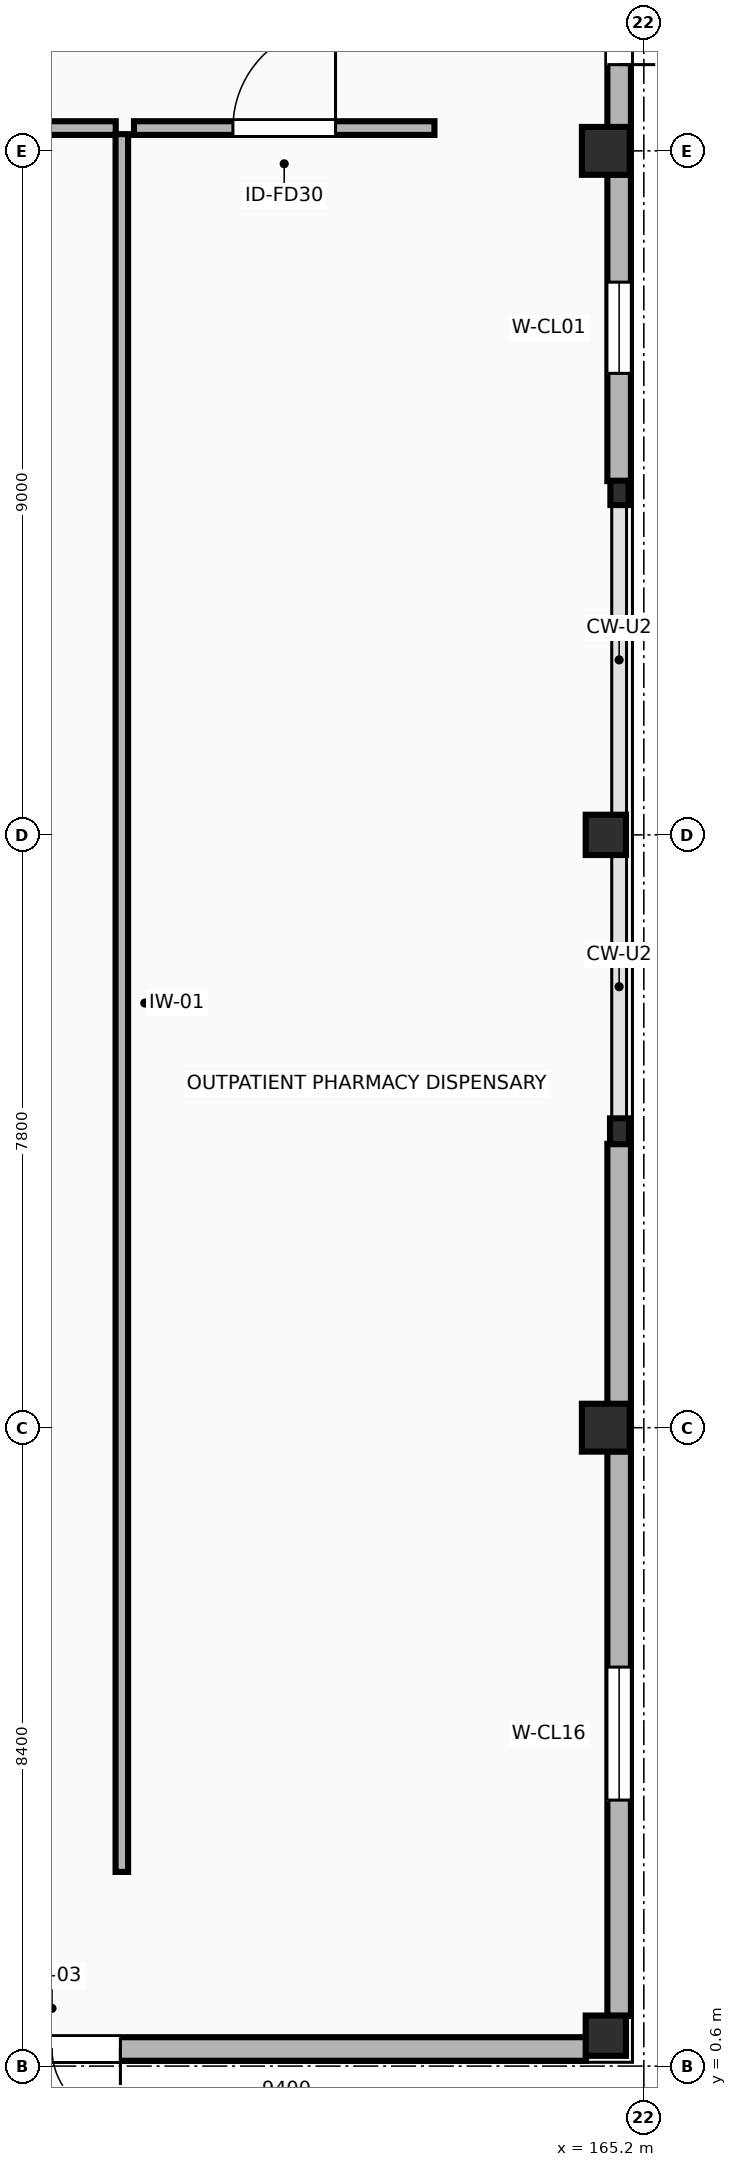
"""IFC4 building model, lengths in metres.
Left out: names, types, materials, properties, quantities, classifications, styles, units other than length and angle.
Written with IfcOpenShell. Run it as: python <this file> out.ifc"""

import sys

from ifc_helpers import new_model, si_unit, direction, frame, frame_2d, origin, origin_2d, place, context, subcontext, project, spatial, rectangle, extrude, element, fill, save


model = new_model("IFC4")
c1 = context("Model", 3, precision=1e-05, world=origin(), true_north=direction((0.0, 1.0)))
c2 = subcontext(c1, "Body", "Model", "MODEL_VIEW")
j1 = project(units=[si_unit("LENGTHUNIT", "METRE"), si_unit("PLANEANGLEUNIT", "RADIAN")], contexts=[c1])
p1 = place(None, origin())
s1 = spatial("IfcSite", under=j1, at=p1, CompositionType="ELEMENT")
p2 = place(p1, origin())
s2 = spatial("IfcBuilding", under=s1, at=p2, CompositionType="ELEMENT")
p3 = place(p2, origin())
s3 = spatial("IfcBuildingStorey", under=s2, at=p3, CompositionType="ELEMENT", Elevation=0.0)
p4 = place(p3, frame((164.7, 1.0, -1.75), z_axis=(0.0, 0.0, 1.0), x_axis=(1.0, 0.0, 0.0)))
e1 = element("IfcColumn", 1, at=p4, inside=s3, PredefinedType="COLUMN", context=c2, shape_type="SweptSolid", body=[
    extrude(rectangle(XDim=0.53, YDim=0.53, at=origin_2d()), origin(), (0.0, 0.0, 1.0), 7.15),
])
p5 = place(p3, frame((164.7, 9.0, -1.75), z_axis=(0.0, 0.0, 1.0), x_axis=(1.0, 0.0, 0.0)))
e2 = element("IfcColumn", 2, at=p5, inside=s3, PredefinedType="COLUMN", context=c2, shape_type="SweptSolid", body=[
    extrude(rectangle(XDim=0.63, YDim=0.63, at=origin_2d()), origin(), (0.0, 0.0, 1.0), 7.15),
])
p6 = place(p3, frame((164.7, 16.8, 0.0), z_axis=(0.0, 0.0, 1.0), x_axis=(1.0, 0.0, 0.0)))
e3 = element("IfcColumn", 3, at=p6, inside=s3, PredefinedType="COLUMN", context=c2, shape_type="SweptSolid", body=[
    extrude(rectangle(XDim=0.53, YDim=0.53, at=origin_2d()), origin(), (0.0, 0.0, 1.0), 5.4),
])
p7 = place(p3, frame((164.7, 25.8, 0.0), z_axis=(0.0, 0.0, 1.0), x_axis=(1.0, 0.0, 0.0)))
e4 = element("IfcColumn", 4, at=p7, inside=s3, PredefinedType="COLUMN", context=c2, shape_type="SweptSolid", body=[
    extrude(rectangle(XDim=0.63, YDim=0.63, at=origin_2d()), origin(), (0.0, 0.0, 1.0), 5.4),
])
p8 = place(p3, frame((164.88, 12.9, -1.75), z_axis=(0.0, 0.0, 1.0), x_axis=(1.0, 0.0, 0.0)))
e5 = element("IfcColumn", 5, at=p8, inside=s3, PredefinedType="PILASTER", context=c2, shape_type="SweptSolid", body=[
    extrude(rectangle(XDim=0.25, YDim=0.34, at=origin_2d()), origin(), (0.0, 0.0, 1.0), 7.15),
])
p9 = place(p3, frame((164.88, 21.3, -1.75), z_axis=(0.0, 0.0, 1.0), x_axis=(1.0, 0.0, 0.0)))
e6 = element("IfcColumn", 6, at=p9, inside=s3, PredefinedType="PILASTER", context=c2, shape_type="SweptSolid", body=[
    extrude(rectangle(XDim=0.24, YDim=0.32, at=origin_2d()), origin(), (0.0, 0.0, 1.0), 7.15),
])
p10 = place(p3, frame((156.085, 0.825, 0.0), z_axis=(0.0, 0.0, 1.0), x_axis=(1.0, 0.0, 0.0)))
e7 = element("IfcWall", 7, at=p10, inside=s3, PredefinedType="STANDARD", context=c2, shape_type="SweptSolid", body=[
    extrude(rectangle(XDim=8.355, YDim=0.31, at=frame_2d((4.177, 0.0))), origin(), (0.0, 0.0, 1.0), 4.42),
])
p11 = place(p10, frame((0.428, 0.0, 0.0)))
e8 = element("IfcOpeningElement", 8, at=p11, cuts=e7, PredefinedType="OPENING", context=c2, shape_type="SweptSolid", body=[
    extrude(rectangle(XDim=1.8, YDim=2.3, at=frame_2d((0.9, 1.15))), frame((0.0, 0.165, 0.0), z_axis=(0.0, -1.0, 0.0), x_axis=(1.0, 0.0, 0.0)), (0.0, 0.0, 1.0), 0.33),
])
p12 = place(p3, frame((164.875, 1.26, 0.0), z_axis=(0.0, 0.0, 1.0), x_axis=(0.0, 1.0, 0.0)))
e9 = element("IfcWall", 9, at=p12, inside=s3, PredefinedType="STANDARD", context=c2, shape_type="SweptSolid", body=[
    extrude(rectangle(XDim=7.43, YDim=0.31, at=frame_2d((3.715, 0.0))), origin(), (0.0, 0.0, 1.0), 4.57),
])
p13 = place(p12, frame((2.84, 0.0, 0.95)))
e10 = element("IfcOpeningElement", 10, at=p13, cuts=e9, PredefinedType="OPENING", context=c2, shape_type="SweptSolid", body=[
    extrude(rectangle(XDim=1.75, YDim=1.65, at=frame_2d((0.875, 0.825))), frame((0.0, 0.165, 0.0), z_axis=(0.0, -1.0, 0.0), x_axis=(1.0, 0.0, 0.0)), (0.0, 0.0, 1.0), 0.33),
])
p14 = place(p3, frame((164.875, 9.31, 0.0), z_axis=(0.0, 0.0, 1.0), x_axis=(0.0, 1.0, 0.0)))
e11 = element("IfcWall", 11, at=p14, inside=s3, PredefinedType="STANDARD", context=c2, shape_type="SweptSolid", body=[
    extrude(rectangle(XDim=3.425, YDim=0.31, at=frame_2d((1.712, 0.0))), origin(), (0.0, 0.0, 1.0), 4.57),
])
p15 = place(p3, frame((164.875, 21.455, 0.0), z_axis=(0.0, 0.0, 1.0), x_axis=(0.0, 1.0, 0.0)))
e12 = element("IfcWall", 12, at=p15, inside=s3, PredefinedType="STANDARD", context=c2, shape_type="SweptSolid", body=[
    extrude(rectangle(XDim=4.035, YDim=0.31, at=frame_2d((2.018, 0.0))), origin(), (0.0, 0.0, 1.0), 4.57),
])
p16 = place(p15, frame((1.417, 0.0, 0.95)))
e13 = element("IfcOpeningElement", 13, at=p16, cuts=e12, PredefinedType="OPENING", context=c2, shape_type="SweptSolid", body=[
    extrude(rectangle(XDim=1.2, YDim=1.5, at=frame_2d((0.6, 0.75))), frame((0.0, 0.165, 0.0), z_axis=(0.0, -1.0, 0.0), x_axis=(1.0, 0.0, 0.0)), (0.0, 0.0, 1.0), 0.33),
])
p17 = place(p3, frame((164.875, 26.11, 0.0), z_axis=(0.0, 0.0, 1.0), x_axis=(0.0, 1.0, 0.0)))
e14 = element("IfcWall", 14, at=p17, inside=s3, PredefinedType="STANDARD", context=c2, shape_type="SweptSolid", body=[
    extrude(rectangle(XDim=8.23, YDim=0.31, at=frame_2d((4.115, 0.0))), origin(), (0.0, 0.0, 1.0), 4.57),
])
p18 = place(p17, frame((0.825, 0.0, 0.0)))
e15 = element("IfcOpeningElement", 15, at=p18, cuts=e14, PredefinedType="OPENING", context=c2, shape_type="SweptSolid", body=[
    extrude(rectangle(XDim=2.0, YDim=2.4, at=frame_2d((1.0, 1.2))), frame((0.0, 0.165, 0.0), z_axis=(0.0, -1.0, 0.0), x_axis=(1.0, 0.0, 0.0)), (0.0, 0.0, 1.0), 0.33),
])
p19 = place(p3, frame((152.174, 26.1, 0.0), z_axis=(0.0, 0.0, 1.0), x_axis=(1.0, 0.0, 0.0)))
e16 = element("IfcWall", 16, at=p19, inside=s3, PredefinedType="PARTITIONING", context=c2, shape_type="SweptSolid", body=[
    extrude(rectangle(XDim=6.078, YDim=0.18, at=frame_2d((3.039, 0.0))), origin(), (0.0, 0.0, 1.0), 4.435),
])
p20 = place(p19, frame((1.629, 0.0, 0.0)))
e17 = element("IfcOpeningElement", 17, at=p20, cuts=e16, PredefinedType="OPENING", context=c2, shape_type="SweptSolid", body=[
    extrude(rectangle(XDim=1.32, YDim=2.22, at=frame_2d((0.66, 1.11))), frame((0.0, 0.1, 0.0), z_axis=(0.0, -1.0, 0.0), x_axis=(1.0, 0.0, 0.0)), (0.0, 0.0, 1.0), 0.2),
])
p21 = place(p3, frame((158.332, 26.02, 0.0), z_axis=(0.0, 0.0, 1.0), x_axis=(0.0, -1.0, 0.0)))
e18 = element("IfcWall", 18, at=p21, inside=s3, PredefinedType="PARTITIONING", context=c2, shape_type="SweptSolid", body=[
    extrude(rectangle(XDim=22.865, YDim=0.165, at=frame_2d((11.433, 0.0))), origin(), (0.0, 0.0, 1.0), 4.759),
])
p22 = place(p3, frame((158.492, 26.1, 0.0), z_axis=(0.0, 0.0, 1.0), x_axis=(1.0, 0.0, 0.0)))
e19 = element("IfcWall", 19, at=p22, inside=s3, PredefinedType="PARTITIONING", context=c2, shape_type="SweptSolid", body=[
    extrude(rectangle(XDim=3.953, YDim=0.18, at=frame_2d((1.977, 0.0))), origin(), (0.0, 0.0, 1.0), 4.46),
])
p23 = place(p22, frame((1.302, 0.0, 0.0)))
e20 = element("IfcOpeningElement", 20, at=p23, cuts=e19, PredefinedType="OPENING", context=c2, shape_type="SweptSolid", body=[
    extrude(rectangle(XDim=1.35, YDim=2.2, at=frame_2d((0.675, 1.1))), frame((0.0, 0.1, 0.0), z_axis=(0.0, -1.0, 0.0), x_axis=(1.0, 0.0, 0.0)), (0.0, 0.0, 1.0), 0.2),
])
p24 = place(p11, frame((1.8, 0.0, 0.0), z_axis=(0.0, 0.0, 1.0), x_axis=(-1.0, 0.0, 0.0)))
e21 = element("IfcDoor", 21, at=p24, inside=s3, OperationType="DOUBLE_DOOR_SINGLE_SWING", PredefinedType="DOOR", context=c2, shape_type="SweptSolid", body=[
    extrude(rectangle(XDim=1.8, YDim=2.3, at=frame_2d((0.9, 1.15))), frame((0.0, 0.025, 0.0), z_axis=(0.0, -1.0, 0.0), x_axis=(1.0, 0.0, 0.0)), (0.0, 0.0, 1.0), 0.05),
])
fill(e8, e21)
p25 = place(p13, origin())
e22 = element("IfcWindow", 22, at=p25, inside=s3, PartitioningType="SINGLE_PANEL", PredefinedType="WINDOW", context=c2, shape_type="SweptSolid", body=[
    extrude(rectangle(XDim=1.75, YDim=1.65, at=frame_2d((0.875, 0.825))), frame((0.0, 0.03, 0.0), z_axis=(0.0, -1.0, 0.0), x_axis=(1.0, 0.0, 0.0)), (0.0, 0.0, 1.0), 0.06),
])
fill(e10, e22)
p26 = place(p16, origin())
e23 = element("IfcWindow", 23, at=p26, inside=s3, PartitioningType="SINGLE_PANEL", PredefinedType="WINDOW", context=c2, shape_type="SweptSolid", body=[
    extrude(rectangle(XDim=1.2, YDim=1.5, at=frame_2d((0.6, 0.75))), frame((0.0, 0.03, 0.0), z_axis=(0.0, -1.0, 0.0), x_axis=(1.0, 0.0, 0.0)), (0.0, 0.0, 1.0), 0.06),
])
fill(e13, e23)
p27 = place(p18, frame((2.0, 0.0, 0.0), z_axis=(0.0, 0.0, 1.0), x_axis=(-1.0, 0.0, 0.0)))
e24 = element("IfcDoor", 24, at=p27, inside=s3, OperationType="DOUBLE_DOOR_SINGLE_SWING", PredefinedType="DOOR", context=c2, shape_type="SweptSolid", body=[
    extrude(rectangle(XDim=2.0, YDim=2.4, at=frame_2d((1.0, 1.2))), frame((0.0, 0.025, 0.0), z_axis=(0.0, -1.0, 0.0), x_axis=(1.0, 0.0, 0.0)), (0.0, 0.0, 1.0), 0.05),
])
fill(e15, e24)
p28 = place(p23, origin())
e25 = element("IfcDoor", 25, at=p28, inside=s3, OperationType="SINGLE_SWING_RIGHT", PredefinedType="DOOR", context=c2, shape_type="SweptSolid", body=[
    extrude(rectangle(XDim=1.35, YDim=2.2, at=frame_2d((0.675, 1.1))), frame((0.0, 0.025, 0.0), z_axis=(0.0, -1.0, 0.0), x_axis=(1.0, 0.0, 0.0)), (0.0, 0.0, 1.0), 0.05),
])
fill(e20, e25)
save(model, sys.argv[1])
